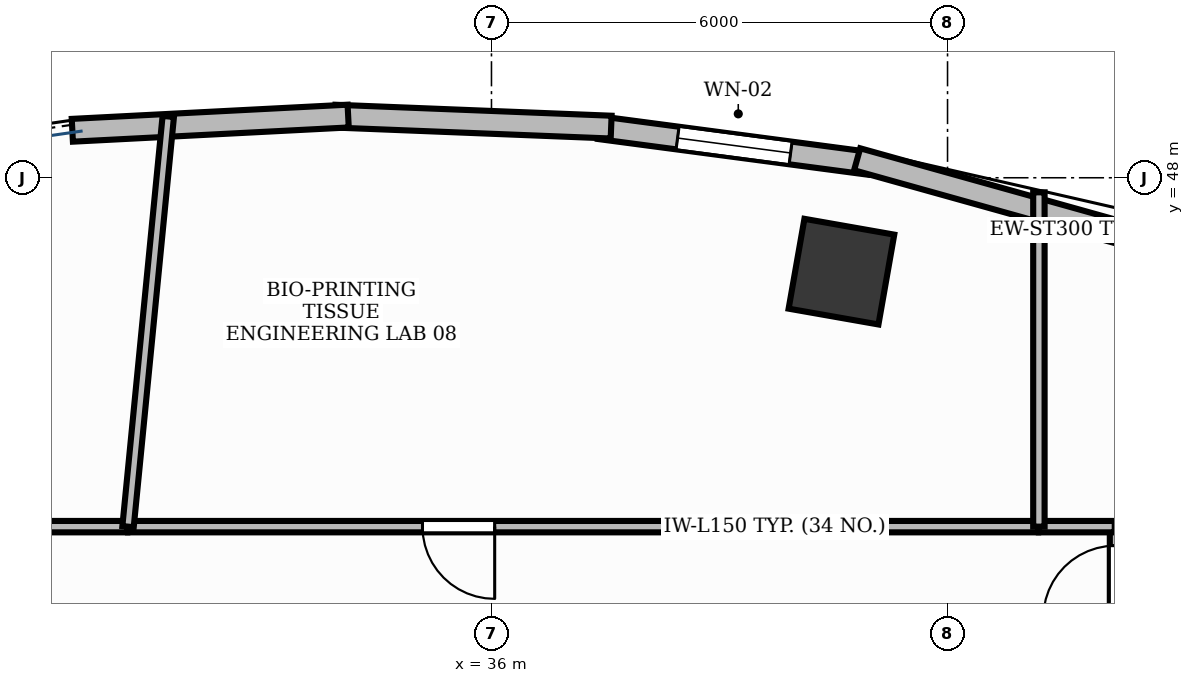
"""IFC4 building model, lengths in metres.
Left out: names, types, materials, properties, quantities, classifications, styles, units other than length and angle.
Written with IfcOpenShell. Run it as: python <this file> out.ifc"""

import sys

from ifc_helpers import new_model, si_unit, direction, frame, frame_2d, origin, origin_2d, place, context, subcontext, project, spatial, rectangle, extrude, element, fill, save


model = new_model("IFC4")
c1 = context("Model", 3, precision=1e-05, world=origin(), true_north=direction((0.0, 1.0)))
c2 = subcontext(c1, "Body", "Model", "MODEL_VIEW")
j1 = project(units=[si_unit("LENGTHUNIT", "METRE"), si_unit("PLANEANGLEUNIT", "RADIAN")], contexts=[c1])
p1 = place(None, origin())
s1 = spatial("IfcSite", under=j1, at=p1, CompositionType="ELEMENT")
p2 = place(p1, origin())
s2 = spatial("IfcBuilding", under=s1, at=p2, CompositionType="ELEMENT")
p3 = place(p2, frame((0.0, 0.0, 140.4)))
s3 = spatial("IfcBuildingStorey", under=s2, at=p3, CompositionType="ELEMENT", Elevation=140.4)
p4 = place(p3, frame((40.604, 46.765, -0.0), z_axis=(0.0, 0.0, 1.0), x_axis=(-0.984868307662, 0.173304404339, 0.0)))
e1 = element("IfcColumn", 1, at=p4, inside=s3, PredefinedType="COLUMN", context=c2, shape_type="SweptSolid", body=[
    extrude(rectangle(XDim=1.2, YDim=1.2, at=origin_2d()), origin(), (0.0, 0.0, 1.0), 3.901),
])
p5 = place(p3, frame((40.964, 48.19, 0.0), z_axis=(0.0, 0.0, 1.0), x_axis=(-0.991369257822, 0.131099178664, 0.0)))
e2 = element("IfcWall", 2, at=p5, inside=s3, PredefinedType="STANDARD", context=c2, shape_type="SweptSolid", body=[
    extrude(rectangle(XDim=3.575, YDim=0.3, at=frame_2d((1.788, 0.0))), origin(), (0.0, 0.0, 1.0), 3.47),
])
p6 = place(p5, frame((1.038, 0.0, 0.95)))
e3 = element("IfcOpeningElement", 3, at=p6, cuts=e2, PredefinedType="OPENING", context=c2, shape_type="SweptSolid", body=[
    extrude(rectangle(XDim=1.5, YDim=1.8, at=frame_2d((0.75, 0.9))), frame((0.0, 0.165, 0.0), z_axis=(0.0, -1.0, 0.0), x_axis=(1.0, 0.0, 0.0)), (0.0, 0.0, 1.0), 0.33),
])
p7 = place(p3, frame((47.479, 46.38, 0.0), z_axis=(0.0, 0.0, 1.0), x_axis=(-0.963116215402, 0.269085777459, 0.0)))
e4 = element("IfcWall", 4, at=p7, inside=s3, PredefinedType="STANDARD", context=c2, shape_type="SweptSolid", body=[
    extrude(rectangle(XDim=6.924, YDim=0.3, at=frame_2d((3.462, 0.0))), origin(), (0.0, 0.0, 1.0), 3.9),
])
p8 = place(p3, frame((37.574, 48.666, 0.0), z_axis=(0.0, 0.0, 1.0), x_axis=(-0.999212076676, 0.039689114679, 0.0)))
e5 = element("IfcWall", 5, at=p8, inside=s3, PredefinedType="STANDARD", context=c2, shape_type="SweptSolid", body=[
    extrude(rectangle(XDim=3.635, YDim=0.3, at=frame_2d((1.818, 0.0))), origin(), (0.0, 0.0, 1.0), 3.9),
])
p9 = place(p3, frame((34.115, 48.812, 0.0), z_axis=(0.0, 0.0, 1.0), x_axis=(-0.998674767218, -0.051465613004, 0.0)))
e6 = element("IfcWall", 6, at=p9, inside=s3, PredefinedType="STANDARD", context=c2, shape_type="SweptSolid", body=[
    extrude(rectangle(XDim=3.634, YDim=0.3, at=frame_2d((1.817, 0.0))), origin(), (0.0, 0.0, 1.0), 3.47),
])
p10 = place(p3, frame((44.21, 33.175, 0.0), z_axis=(0.0, 0.0, 1.0), x_axis=(0.0, 1.0, 0.0)))
e7 = element("IfcWall", 7, at=p10, inside=s3, PredefinedType="PARTITIONING", context=c2, shape_type="SweptSolid", body=[
    extrude(rectangle(XDim=10.225, YDim=0.15, at=frame_2d((5.112, 0.0))), origin(), (0.0, 0.0, 1.0), 2.91),
])
p11 = place(p10, frame((9.035, 0.0, 0.0)))
e8 = element("IfcOpeningElement", 8, at=p11, cuts=e7, PredefinedType="OPENING", context=c2, shape_type="SweptSolid", body=[
    extrude(rectangle(XDim=0.95, YDim=2.15, at=frame_2d((0.475, 1.075))), frame((0.0, 0.09, 0.0), z_axis=(0.0, -1.0, 0.0), x_axis=(1.0, 0.0, 0.0)), (0.0, 0.0, 1.0), 0.18),
])
p12 = place(p3, frame((43.192, 43.41, 0.0), z_axis=(0.0, 0.0, 1.0), x_axis=(-1.0, 0.0, 0.0)))
e9 = element("IfcWall", 9, at=p12, inside=s3, PredefinedType="PARTITIONING", context=c2, shape_type="SweptSolid", body=[
    extrude(rectangle(XDim=11.973, YDim=0.15, at=frame_2d((5.987, 0.0))), origin(), (0.0, 0.0, 1.0), 2.91),
])
p13 = place(p12, frame((7.15, 0.0, 0.0)))
e10 = element("IfcOpeningElement", 10, at=p13, cuts=e9, PredefinedType="OPENING", context=c2, shape_type="SweptSolid", body=[
    extrude(rectangle(XDim=0.95, YDim=2.15, at=frame_2d((0.475, 1.075))), frame((0.0, 0.09, 0.0), z_axis=(0.0, -1.0, 0.0), x_axis=(1.0, 0.0, 0.0)), (0.0, 0.0, 1.0), 0.18),
])
p14 = place(p3, frame((31.209, 43.41, 0.0), z_axis=(0.0, 0.0, 1.0), x_axis=(-1.0, 0.0, 0.0)))
e11 = element("IfcWall", 11, at=p14, inside=s3, PredefinedType="PARTITIONING", context=c2, shape_type="SweptSolid", body=[
    extrude(rectangle(XDim=11.166, YDim=0.15, at=frame_2d((5.583, 0.0))), origin(), (0.0, 0.0, 1.0), 2.91),
])
p15 = place(p14, frame((3.494, 0.0, 0.0)))
e12 = element("IfcOpeningElement", 12, at=p15, cuts=e11, PredefinedType="OPENING", context=c2, shape_type="SweptSolid", body=[
    extrude(rectangle(XDim=0.95, YDim=2.15, at=frame_2d((0.475, 1.075))), frame((0.0, 0.09, 0.0), z_axis=(0.0, -1.0, 0.0), x_axis=(1.0, 0.0, 0.0)), (0.0, 0.0, 1.0), 0.18),
])
p16 = place(p3, frame((44.2, 43.41, 0.0), z_axis=(0.0, 0.0, 1.0), x_axis=(-1.0, 0.0, 0.0)))
e13 = element("IfcWall", 13, at=p16, inside=s3, PredefinedType="PARTITIONING", context=c2, shape_type="SweptSolid", body=[
    extrude(rectangle(XDim=0.998, YDim=0.15, at=frame_2d((0.499, 0.0))), origin(), (0.0, 0.0, 1.0), 2.91),
])
p17 = place(p3, frame((43.202, 43.41, 0.0), z_axis=(0.0, 0.0, 1.0), x_axis=(0.0, 1.0, 0.0)))
e14 = element("IfcWall", 14, at=p17, inside=s3, PredefinedType="PARTITIONING", context=c2, shape_type="SweptSolid", body=[
    extrude(rectangle(XDim=4.398, YDim=0.15, at=frame_2d((2.199, 0.0))), origin(), (0.0, 0.0, 1.0), 2.91),
])
p18 = place(p3, frame((31.219, 43.41, 0.0), z_axis=(0.0, 0.0, 1.0), x_axis=(0.097560057389, 0.995229639431, 0.0)))
e15 = element("IfcWall", 15, at=p18, inside=s3, PredefinedType="PARTITIONING", context=c2, shape_type="SweptSolid", body=[
    extrude(rectangle(XDim=5.423, YDim=0.15, at=frame_2d((2.711, 0.0))), origin(), (0.0, 0.0, 1.0), 2.91),
])
p19 = place(p6, origin())
e16 = element("IfcWindow", 16, at=p19, inside=s3, PartitioningType="DOUBLE_PANEL_VERTICAL", PredefinedType="WINDOW", context=c2, shape_type="SweptSolid", body=[
    extrude(rectangle(XDim=1.5, YDim=1.8, at=frame_2d((0.75, 0.9))), frame((0.0, 0.03, 0.0), z_axis=(0.0, -1.0, 0.0), x_axis=(1.0, 0.0, 0.0)), (0.0, 0.0, 1.0), 0.06),
])
fill(e3, e16)
p20 = place(p11, origin())
e17 = element("IfcDoor", 17, at=p20, inside=s3, OperationType="SINGLE_SWING_LEFT", PredefinedType="DOOR", context=c2, shape_type="SweptSolid", body=[
    extrude(rectangle(XDim=0.95, YDim=2.15, at=frame_2d((0.475, 1.075))), frame((0.0, 0.025, 0.0), z_axis=(0.0, -1.0, 0.0), x_axis=(1.0, 0.0, 0.0)), (0.0, 0.0, 1.0), 0.05),
])
fill(e8, e17)
p21 = place(p13, origin())
e18 = element("IfcDoor", 18, at=p21, inside=s3, OperationType="SINGLE_SWING_LEFT", PredefinedType="DOOR", context=c2, shape_type="SweptSolid", body=[
    extrude(rectangle(XDim=0.95, YDim=2.15, at=frame_2d((0.475, 1.075))), frame((0.0, 0.025, 0.0), z_axis=(0.0, -1.0, 0.0), x_axis=(1.0, 0.0, 0.0)), (0.0, 0.0, 1.0), 0.05),
])
fill(e10, e18)
save(model, sys.argv[1])
